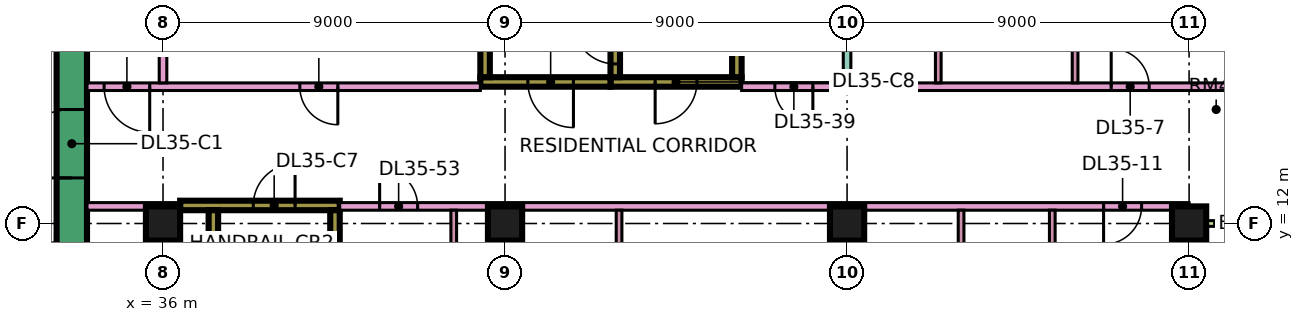
"""IFC4 building model, lengths in metres.
Left out: names, types, materials, properties, quantities, classifications, styles, units other than length and angle.
Written with IfcOpenShell. Run it as: python <this file> out.ifc"""

import sys

from ifc_helpers import new_model, si_unit, direction, frame, frame_2d, origin, origin_2d, place, context, subcontext, project, spatial, rectangle, extrude, element, fill, save


model = new_model("IFC4")
c1 = context("Model", 3, precision=1e-05, world=origin(), true_north=direction((0.0, 1.0)))
c2 = subcontext(c1, "Body", "Model", "MODEL_VIEW")
j1 = project(units=[si_unit("LENGTHUNIT", "METRE"), si_unit("PLANEANGLEUNIT", "RADIAN")], contexts=[c1])
p1 = place(None, origin())
s1 = spatial("IfcSite", under=j1, at=p1, CompositionType="ELEMENT")
p2 = place(p1, origin())
s2 = spatial("IfcBuilding", under=s1, at=p2, CompositionType="ELEMENT")
p3 = place(p2, frame((0.0, 0.0, 157.4)))
s3 = spatial("IfcBuildingStorey", under=s2, at=p3, CompositionType="ELEMENT", Elevation=157.4)
for number, where, z_axis, x_axis in (
    (1, (36.0, 12.0, 0.0), (0.0, 0.0, 1.0), (1.0, 0.0, 0.0)),
    (2, (45.0, 12.0, 0.0), (0.0, 0.0, 1.0), (1.0, 0.0, 0.0)),
    (3, (54.0, 12.0, 0.0), (0.0, 0.0, 1.0), (1.0, 0.0, 0.0)),
    (4, (63.0, 12.0, 0.0), (0.0, 0.0, 1.0), (1.0, 0.0, 0.0)),
):
    element("IfcColumn", number, at=place(p3, frame(where, z_axis=z_axis, x_axis=x_axis)), inside=s3, PredefinedType="COLUMN", context=c2, shape_type="SweptSolid", body=[
        extrude(rectangle(XDim=0.9, YDim=0.9, at=origin_2d()), origin(), (0.0, 0.0, 1.0), 3.75),
    ])
p4 = place(p3, frame((33.6, 7.8, 0.0), z_axis=(0.0, 0.0, 1.0), x_axis=(0.0, 1.0, 0.0)))
e5 = element("IfcWall", 5, at=p4, inside=s3, PredefinedType="SHEAR", context=c2, shape_type="SweptSolid", body=[
    extrude(rectangle(XDim=11.4, YDim=0.8, at=frame_2d((5.7, 0.0))), origin(), (0.0, 0.0, 1.0), 3.75),
])
p5 = place(p4, frame((5.4, 0.0, 0.0)))
e6 = element("IfcOpeningElement", 6, at=p5, cuts=e5, PredefinedType="OPENING", context=c2, shape_type="SweptSolid", body=[
    extrude(rectangle(XDim=1.8, YDim=2.4, at=frame_2d((0.9, 1.2))), frame((0.0, 0.41, 0.0), z_axis=(0.0, -1.0, 0.0), x_axis=(1.0, 0.0, 0.0)), (0.0, 0.0, 1.0), 0.82),
])
p6 = place(p3, frame((36.45, 12.475, 0.0), z_axis=(0.0, 0.0, 1.0), x_axis=(1.0, 0.0, 0.0)))
e7 = element("IfcWall", 7, at=p6, inside=s3, PredefinedType="SHEAR", context=c2, shape_type="SweptSolid", body=[
    extrude(rectangle(XDim=4.2, YDim=0.25, at=frame_2d((2.1, 0.0))), origin(), (0.0, 0.0, 1.0), 3.75),
])
p7 = place(p6, frame((1.925, 0.0, 0.0)))
e8 = element("IfcOpeningElement", 8, at=p7, cuts=e7, PredefinedType="OPENING", context=c2, shape_type="SweptSolid", body=[
    extrude(rectangle(XDim=1.1, YDim=2.2, at=frame_2d((0.55, 1.1))), frame((0.0, 0.135, 0.0), z_axis=(0.0, -1.0, 0.0), x_axis=(1.0, 0.0, 0.0)), (0.0, 0.0, 1.0), 0.27),
])
for number, where, z_axis, x_axis in (
    (9, (37.325, 5.85, 0.0), (0.0, 0.0, 1.0), (0.0, 1.0, 0.0)),
    (10, (40.525, 5.85, 0.0), (0.0, 0.0, 1.0), (0.0, 1.0, 0.0)),
):
    element("IfcWall", number, at=place(p3, frame(where, z_axis=z_axis, x_axis=x_axis)), inside=s3, PredefinedType="SHEAR", context=c2, shape_type="SweptSolid", body=[
        extrude(rectangle(XDim=6.5, YDim=0.25, at=frame_2d((3.25, 0.0))), origin(), (0.0, 0.0, 1.0), 3.75),
    ])
p8 = place(p3, frame((47.775, 15.725, 0.0), z_axis=(0.0, 0.0, 1.0), x_axis=(1.0, 0.0, 0.0)))
e11 = element("IfcWall", 11, at=p8, inside=s3, PredefinedType="SHEAR", context=c2, shape_type="SweptSolid", body=[
    extrude(rectangle(XDim=3.45, YDim=0.25, at=frame_2d((1.725, 0.0))), origin(), (0.0, 0.0, 1.0), 3.75),
])
p9 = place(p8, frame((1.175, 0.0, 0.0)))
e12 = element("IfcOpeningElement", 12, at=p9, cuts=e11, PredefinedType="OPENING", context=c2, shape_type="SweptSolid", body=[
    extrude(rectangle(XDim=1.1, YDim=2.2, at=frame_2d((0.55, 1.1))), frame((0.0, 0.135, 0.0), z_axis=(0.0, -1.0, 0.0), x_axis=(1.0, 0.0, 0.0)), (0.0, 0.0, 1.0), 0.27),
])
p10 = place(p3, frame((47.9, 15.85, 0.0), z_axis=(0.0, 0.0, 1.0), x_axis=(0.0, 1.0, 0.0)))
e13 = element("IfcWall", 13, at=p10, inside=s3, PredefinedType="SHEAR", context=c2, shape_type="SweptSolid", body=[
    extrude(rectangle(XDim=6.5, YDim=0.25, at=frame_2d((3.25, 0.0))), origin(), (0.0, 0.0, 1.0), 3.75),
])
p11 = place(p10, frame((0.35, 0.0, 0.0)))
e14 = element("IfcOpeningElement", 14, at=p11, cuts=e13, PredefinedType="OPENING", context=c2, shape_type="SweptSolid", body=[
    extrude(rectangle(XDim=1.1, YDim=2.2, at=frame_2d((0.55, 1.1))), frame((0.0, 0.135, 0.0), z_axis=(0.0, -1.0, 0.0), x_axis=(1.0, 0.0, 0.0)), (0.0, 0.0, 1.0), 0.27),
])
p12 = place(p3, frame((51.1, 15.85, 0.0), z_axis=(0.0, 0.0, 1.0), x_axis=(0.0, 1.0, 0.0)))
e15 = element("IfcWall", 15, at=p12, inside=s3, PredefinedType="SHEAR", context=c2, shape_type="SweptSolid", body=[
    extrude(rectangle(XDim=6.5, YDim=0.25, at=frame_2d((3.25, 0.0))), origin(), (0.0, 0.0, 1.0), 3.75),
])
p13 = place(p3, frame((44.35, 15.725, 0.0), z_axis=(0.0, 0.0, 1.0), x_axis=(1.0, 0.0, 0.0)))
e16 = element("IfcWall", 16, at=p13, inside=s3, PredefinedType="SHEAR", context=c2, shape_type="SweptSolid", body=[
    extrude(rectangle(XDim=3.425, YDim=0.25, at=frame_2d((1.712, 0.0))), origin(), (0.0, 0.0, 1.0), 3.75),
])
p14 = place(p13, frame((1.25, 0.0, 0.0)))
e17 = element("IfcOpeningElement", 17, at=p14, cuts=e16, PredefinedType="OPENING", context=c2, shape_type="SweptSolid", body=[
    extrude(rectangle(XDim=1.2, YDim=2.2, at=frame_2d((0.6, 1.1))), frame((0.0, 0.135, 0.0), z_axis=(0.0, -1.0, 0.0), x_axis=(1.0, 0.0, 0.0)), (0.0, 0.0, 1.0), 0.27),
])
p15 = place(p3, frame((44.475, 15.85, 0.0), z_axis=(0.0, 0.0, 1.0), x_axis=(0.0, 1.0, 0.0)))
e18 = element("IfcWall", 18, at=p15, inside=s3, PredefinedType="SHEAR", context=c2, shape_type="SweptSolid", body=[
    extrude(rectangle(XDim=6.5, YDim=0.25, at=frame_2d((3.25, 0.0))), origin(), (0.0, 0.0, 1.0), 3.75),
])
p16 = place(p15, frame((1.75, 0.0, 0.0)))
e19 = element("IfcOpeningElement", 19, at=p16, cuts=e18, PredefinedType="OPENING", context=c2, shape_type="SweptSolid", body=[
    extrude(rectangle(XDim=1.1, YDim=2.2, at=frame_2d((0.55, 1.1))), frame((0.0, 0.135, 0.0), z_axis=(0.0, -1.0, 0.0), x_axis=(1.0, 0.0, 0.0)), (0.0, 0.0, 1.0), 0.27),
])
p17 = place(p15, frame((4.3, 0.0, 0.0)))
e20 = element("IfcOpeningElement", 20, at=p17, cuts=e18, PredefinedType="OPENING", context=c2, shape_type="SweptSolid", body=[
    extrude(rectangle(XDim=1.1, YDim=2.2, at=frame_2d((0.55, 1.1))), frame((0.0, 0.135, 0.0), z_axis=(0.0, -1.0, 0.0), x_axis=(1.0, 0.0, 0.0)), (0.0, 0.0, 1.0), 0.27),
])
p18 = place(p3, frame((63.0, 1.575, 0.0), z_axis=(0.0, 0.0, 1.0), x_axis=(0.0, 1.0, 0.0)))
e21 = element("IfcWall", 21, at=p18, inside=s3, PredefinedType="SOLIDWALL", context=c2, shape_type="SweptSolid", body=[
    extrude(rectangle(XDim=10.35, YDim=0.15, at=frame_2d((5.175, 0.0))), origin(), (0.0, 0.0, 1.0), 3.35),
])
p19 = place(p18, frame((4.038, 0.0, 0.0)))
e22 = element("IfcOpeningElement", 22, at=p19, cuts=e21, PredefinedType="OPENING", context=c2, shape_type="SweptSolid", body=[
    extrude(rectangle(XDim=1.8, YDim=2.4, at=frame_2d((0.9, 1.2))), frame((0.0, 0.085, 0.0), z_axis=(0.0, -1.0, 0.0), x_axis=(1.0, 0.0, 0.0)), (0.0, 0.0, 1.0), 0.17),
])
p20 = place(p3, frame((64.5, 12.0, 0.0), z_axis=(0.0, 0.0, 1.0), x_axis=(-1.0, 0.0, 0.0)))
e23 = element("IfcWall", 23, at=p20, inside=s3, PredefinedType="SOLIDWALL", context=c2, shape_type="SweptSolid", body=[
    extrude(rectangle(XDim=1.5, YDim=0.15, at=frame_2d((0.75, 0.0))), origin(), (0.0, 0.0, 1.0), 3.35),
])
p21 = place(p3, frame((34.0, 12.45, 0.0), z_axis=(0.0, 0.0, 1.0), x_axis=(1.0, 0.0, 0.0)))
e24 = element("IfcWall", 24, at=p21, inside=s3, PredefinedType="PARTITIONING", context=c2, shape_type="SweptSolid", body=[
    extrude(rectangle(XDim=2.451, YDim=0.2, at=frame_2d((1.226, 0.0))), origin(), (0.0, 0.0, 1.0), 3.35),
])
p22 = place(p3, frame((34.0, 15.6, 0.0), z_axis=(0.0, 0.0, 1.0), x_axis=(1.0, 0.0, 0.0)))
e25 = element("IfcWall", 25, at=p22, inside=s3, PredefinedType="PARTITIONING", context=c2, shape_type="SweptSolid", body=[
    extrude(rectangle(XDim=10.35, YDim=0.2, at=frame_2d((5.175, 0.0))), origin(), (0.0, 0.0, 1.0), 3.35),
])
p23 = place(p22, frame((5.6, 0.0, 0.0)))
e26 = element("IfcOpeningElement", 26, at=p23, cuts=e25, PredefinedType="OPENING", context=c2, shape_type="SweptSolid", body=[
    extrude(rectangle(XDim=1.0, YDim=2.1, at=frame_2d((0.5, 1.05))), frame((0.0, 0.11, 0.0), z_axis=(0.0, -1.0, 0.0), x_axis=(1.0, 0.0, 0.0)), (0.0, 0.0, 1.0), 0.22),
])
p24 = place(p22, frame((0.45, 0.0, 0.0)))
e27 = element("IfcOpeningElement", 27, at=p24, cuts=e25, PredefinedType="OPENING", context=c2, shape_type="SweptSolid", body=[
    extrude(rectangle(XDim=1.2, YDim=2.1, at=frame_2d((0.6, 1.05))), frame((0.0, 0.11, 0.0), z_axis=(0.0, -1.0, 0.0), x_axis=(1.0, 0.0, 0.0)), (0.0, 0.0, 1.0), 0.22),
])
p25 = place(p3, frame((36.0, 15.7, 0.0), z_axis=(0.0, 0.0, 1.0), x_axis=(0.0, 1.0, 0.0)))
e28 = element("IfcWall", 28, at=p25, inside=s3, PredefinedType="PARTITIONING", context=c2, shape_type="SweptSolid", body=[
    extrude(rectangle(XDim=8.3, YDim=0.2, at=frame_2d((4.15, 0.0))), origin(), (0.0, 0.0, 1.0), 3.35),
])
p26 = place(p3, frame((40.65, 12.45, 0.0), z_axis=(0.0, 0.0, 1.0), x_axis=(1.0, 0.0, 0.0)))
e29 = element("IfcWall", 29, at=p26, inside=s3, PredefinedType="PARTITIONING", context=c2, shape_type="SweptSolid", body=[
    extrude(rectangle(XDim=22.35, YDim=0.2, at=frame_2d((11.175, 0.0))), origin(), (0.0, 0.0, 1.0), 3.35),
])
p27 = place(p26, frame((20.1, 0.0, 0.0)))
e30 = element("IfcOpeningElement", 30, at=p27, cuts=e29, PredefinedType="OPENING", context=c2, shape_type="SweptSolid", body=[
    extrude(rectangle(XDim=1.0, YDim=2.1, at=frame_2d((0.5, 1.05))), frame((0.0, 0.11, 0.0), z_axis=(0.0, -1.0, 0.0), x_axis=(1.0, 0.0, 0.0)), (0.0, 0.0, 1.0), 0.22),
])
p28 = place(p26, frame((1.05, 0.0, 0.0)))
e31 = element("IfcOpeningElement", 31, at=p28, cuts=e29, PredefinedType="OPENING", context=c2, shape_type="SweptSolid", body=[
    extrude(rectangle(XDim=1.0, YDim=2.1, at=frame_2d((0.5, 1.05))), frame((0.0, 0.11, 0.0), z_axis=(0.0, -1.0, 0.0), x_axis=(1.0, 0.0, 0.0)), (0.0, 0.0, 1.0), 0.22),
])
p29 = place(p3, frame((43.65, 5.975, 0.0), z_axis=(0.0, 0.0, 1.0), x_axis=(0.0, 1.0, 0.0)))
e32 = element("IfcWall", 32, at=p29, inside=s3, PredefinedType="PARTITIONING", context=c2, shape_type="SweptSolid", body=[
    extrude(rectangle(XDim=6.375, YDim=0.15, at=frame_2d((3.188, 0.0))), origin(), (0.0, 0.0, 1.0), 3.35),
])
p30 = place(p29, frame((4.275, 0.0, 0.0)))
e33 = element("IfcOpeningElement", 33, at=p30, cuts=e32, PredefinedType="OPENING", context=c2, shape_type="SweptSolid", body=[
    extrude(rectangle(XDim=0.9, YDim=2.1, at=frame_2d((0.45, 1.05))), frame((0.0, 0.085, 0.0), z_axis=(0.0, -1.0, 0.0), x_axis=(1.0, 0.0, 0.0)), (0.0, 0.0, 1.0), 0.17),
])
p31 = place(p3, frame((48.0, 5.975, 0.0), z_axis=(0.0, 0.0, 1.0), x_axis=(0.0, 1.0, 0.0)))
e34 = element("IfcWall", 34, at=p31, inside=s3, PredefinedType="PARTITIONING", context=c2, shape_type="SweptSolid", body=[
    extrude(rectangle(XDim=6.375, YDim=0.15, at=frame_2d((3.188, 0.0))), origin(), (0.0, 0.0, 1.0), 3.35),
])
p32 = place(p3, frame((51.225, 15.6, 0.0), z_axis=(0.0, 0.0, 1.0), x_axis=(1.0, 0.0, 0.0)))
e35 = element("IfcWall", 35, at=p32, inside=s3, PredefinedType="PARTITIONING", context=c2, shape_type="SweptSolid", body=[
    extrude(rectangle(XDim=13.125, YDim=0.2, at=frame_2d((6.562, 0.0))), origin(), (0.0, 0.0, 1.0), 3.35),
])
p33 = place(p32, frame((9.725, 0.0, 0.0)))
e36 = element("IfcOpeningElement", 36, at=p33, cuts=e35, PredefinedType="OPENING", context=c2, shape_type="SweptSolid", body=[
    extrude(rectangle(XDim=1.0, YDim=2.1, at=frame_2d((0.5, 1.05))), frame((0.0, 0.11, 0.0), z_axis=(0.0, -1.0, 0.0), x_axis=(1.0, 0.0, 0.0)), (0.0, 0.0, 1.0), 0.22),
])
p34 = place(p32, frame((0.875, 0.0, 0.0)))
e37 = element("IfcOpeningElement", 37, at=p34, cuts=e35, PredefinedType="OPENING", context=c2, shape_type="SweptSolid", body=[
    extrude(rectangle(XDim=1.0, YDim=2.1, at=frame_2d((0.5, 1.05))), frame((0.0, 0.11, 0.0), z_axis=(0.0, -1.0, 0.0), x_axis=(1.0, 0.0, 0.0)), (0.0, 0.0, 1.0), 0.22),
])
p35 = place(p3, frame((54.0, 0.074, 0.0), z_axis=(0.0, 0.0, 1.0), x_axis=(0.0, 1.0, 0.0)))
e38 = element("IfcWall", 38, at=p35, inside=s3, PredefinedType="PARTITIONING", context=c2, shape_type="SweptSolid", body=[
    extrude(rectangle(XDim=12.276, YDim=0.2, at=frame_2d((6.138, 0.0))), origin(), (0.0, 0.0, 1.0), 3.35),
])
p36 = place(p3, frame((54.0, 15.7, 0.0), z_axis=(0.0, 0.0, 1.0), x_axis=(0.0, 1.0, 0.0)))
e39 = element("IfcWall", 39, at=p36, inside=s3, PredefinedType="PARTITIONING", context=c2, shape_type="SweptSolid", body=[
    extrude(rectangle(XDim=8.226, YDim=0.2, at=frame_2d((4.113, 0.0))), origin(), (0.0, 0.0, 1.0), 3.35),
])
p37 = place(p3, frame((56.4, 15.7, 0.0), z_axis=(0.0, 0.0, 1.0), x_axis=(0.0, 1.0, 0.0)))
e40 = element("IfcWall", 40, at=p37, inside=s3, PredefinedType="PARTITIONING", context=c2, shape_type="SweptSolid", body=[
    extrude(rectangle(XDim=2.825, YDim=0.15, at=frame_2d((1.413, 0.0))), origin(), (0.0, 0.0, 1.0), 3.35),
])
for number, where, z_axis, x_axis in (
    (41, (57.0, 7.725, 0.0), (0.0, 0.0, 1.0), (0.0, 1.0, 0.0)),
    (42, (59.4, 7.725, 0.0), (0.0, 0.0, 1.0), (0.0, 1.0, 0.0)),
):
    element("IfcWall", number, at=place(p3, frame(where, z_axis=z_axis, x_axis=x_axis)), inside=s3, PredefinedType="PARTITIONING", context=c2, shape_type="SweptSolid", body=[
        extrude(rectangle(XDim=4.625, YDim=0.15, at=frame_2d((2.312, 0.0))), origin(), (0.0, 0.0, 1.0), 3.35),
    ])
p38 = place(p3, frame((60.0, 15.7, 0.0), z_axis=(0.0, 0.0, 1.0), x_axis=(0.0, 1.0, 0.0)))
e43 = element("IfcWall", 43, at=p38, inside=s3, PredefinedType="PARTITIONING", context=c2, shape_type="SweptSolid", body=[
    extrude(rectangle(XDim=2.825, YDim=0.15, at=frame_2d((1.413, 0.0))), origin(), (0.0, 0.0, 1.0), 3.35),
])
p39 = place(p5, origin())
e44 = element("IfcDoor", 44, at=p39, inside=s3, OperationType="DOUBLE_DOOR_SINGLE_SWING", PredefinedType="DOOR", context=c2, shape_type="SweptSolid", body=[
    extrude(rectangle(XDim=1.8, YDim=2.4, at=frame_2d((0.9, 1.2))), frame((0.0, 0.025, 0.0), z_axis=(0.0, -1.0, 0.0), x_axis=(1.0, 0.0, 0.0)), (0.0, 0.0, 1.0), 0.05),
])
fill(e6, e44)
p40 = place(p7, frame((1.1, 0.0, 0.0), z_axis=(0.0, 0.0, 1.0), x_axis=(-1.0, 0.0, 0.0)))
e45 = element("IfcDoor", 45, at=p40, inside=s3, OperationType="SINGLE_SWING_RIGHT", PredefinedType="DOOR", context=c2, shape_type="SweptSolid", body=[
    extrude(rectangle(XDim=1.1, YDim=2.2, at=frame_2d((0.55, 1.1))), frame((0.0, 0.025, 0.0), z_axis=(0.0, -1.0, 0.0), x_axis=(1.0, 0.0, 0.0)), (0.0, 0.0, 1.0), 0.05),
])
fill(e8, e45)
p41 = place(p9, frame((1.1, 0.0, 0.0), z_axis=(0.0, 0.0, 1.0), x_axis=(-1.0, 0.0, 0.0)))
e46 = element("IfcDoor", 46, at=p41, inside=s3, OperationType="SINGLE_SWING_LEFT", PredefinedType="DOOR", context=c2, shape_type="SweptSolid", body=[
    extrude(rectangle(XDim=1.1, YDim=2.2, at=frame_2d((0.55, 1.1))), frame((0.0, 0.025, 0.0), z_axis=(0.0, -1.0, 0.0), x_axis=(1.0, 0.0, 0.0)), (0.0, 0.0, 1.0), 0.05),
])
fill(e12, e46)
p42 = place(p14, origin())
e47 = element("IfcDoor", 47, at=p42, inside=s3, OperationType="SINGLE_SWING_RIGHT", PredefinedType="DOOR", context=c2, shape_type="SweptSolid", body=[
    extrude(rectangle(XDim=1.2, YDim=2.2, at=frame_2d((0.6, 1.1))), frame((0.0, 0.025, 0.0), z_axis=(0.0, -1.0, 0.0), x_axis=(1.0, 0.0, 0.0)), (0.0, 0.0, 1.0), 0.05),
])
fill(e17, e47)
p43 = place(p11, frame((1.1, 0.0, 0.0), z_axis=(0.0, 0.0, 1.0), x_axis=(-1.0, 0.0, 0.0)))
e48 = element("IfcDoor", 48, at=p43, inside=s3, OperationType="SINGLE_SWING_RIGHT", PredefinedType="DOOR", context=c2, shape_type="SweptSolid", body=[
    extrude(rectangle(XDim=1.1, YDim=2.2, at=frame_2d((0.55, 1.1))), frame((0.0, 0.025, 0.0), z_axis=(0.0, -1.0, 0.0), x_axis=(1.0, 0.0, 0.0)), (0.0, 0.0, 1.0), 0.05),
])
fill(e14, e48)
p44 = place(p23, origin())
e49 = element("IfcDoor", 49, at=p44, inside=s3, OperationType="SINGLE_SWING_RIGHT", PredefinedType="DOOR", context=c2, shape_type="SweptSolid", body=[
    extrude(rectangle(XDim=1.0, YDim=2.1, at=frame_2d((0.5, 1.05))), frame((0.0, 0.025, 0.0), z_axis=(0.0, -1.0, 0.0), x_axis=(1.0, 0.0, 0.0)), (0.0, 0.0, 1.0), 0.05),
])
fill(e26, e49)
p45 = place(p33, origin())
e50 = element("IfcDoor", 50, at=p45, inside=s3, OperationType="SINGLE_SWING_LEFT", PredefinedType="DOOR", context=c2, shape_type="SweptSolid", body=[
    extrude(rectangle(XDim=1.0, YDim=2.1, at=frame_2d((0.5, 1.05))), frame((0.0, 0.025, 0.0), z_axis=(0.0, -1.0, 0.0), x_axis=(1.0, 0.0, 0.0)), (0.0, 0.0, 1.0), 0.05),
])
fill(e36, e50)
p46 = place(p27, frame((1.0, 0.0, 0.0), z_axis=(0.0, 0.0, 1.0), x_axis=(-1.0, 0.0, 0.0)))
e51 = element("IfcDoor", 51, at=p46, inside=s3, OperationType="SINGLE_SWING_LEFT", PredefinedType="DOOR", context=c2, shape_type="SweptSolid", body=[
    extrude(rectangle(XDim=1.0, YDim=2.1, at=frame_2d((0.5, 1.05))), frame((0.0, 0.025, 0.0), z_axis=(0.0, -1.0, 0.0), x_axis=(1.0, 0.0, 0.0)), (0.0, 0.0, 1.0), 0.05),
])
fill(e30, e51)
p47 = place(p24, origin())
e52 = element("IfcDoor", 52, at=p47, inside=s3, OperationType="SINGLE_SWING_RIGHT", PredefinedType="DOOR", context=c2, shape_type="SweptSolid", body=[
    extrude(rectangle(XDim=1.2, YDim=2.1, at=frame_2d((0.6, 1.05))), frame((0.0, 0.025, 0.0), z_axis=(0.0, -1.0, 0.0), x_axis=(1.0, 0.0, 0.0)), (0.0, 0.0, 1.0), 0.05),
])
fill(e27, e52)
p48 = place(p34, origin())
e53 = element("IfcDoor", 53, at=p48, inside=s3, OperationType="SINGLE_SWING_RIGHT", PredefinedType="DOOR", context=c2, shape_type="SweptSolid", body=[
    extrude(rectangle(XDim=1.0, YDim=2.1, at=frame_2d((0.5, 1.05))), frame((0.0, 0.025, 0.0), z_axis=(0.0, -1.0, 0.0), x_axis=(1.0, 0.0, 0.0)), (0.0, 0.0, 1.0), 0.05),
])
fill(e37, e53)
p49 = place(p28, origin())
e54 = element("IfcDoor", 54, at=p49, inside=s3, OperationType="SINGLE_SWING_LEFT", PredefinedType="DOOR", context=c2, shape_type="SweptSolid", body=[
    extrude(rectangle(XDim=1.0, YDim=2.1, at=frame_2d((0.5, 1.05))), frame((0.0, 0.025, 0.0), z_axis=(0.0, -1.0, 0.0), x_axis=(1.0, 0.0, 0.0)), (0.0, 0.0, 1.0), 0.05),
])
fill(e31, e54)
save(model, sys.argv[1])
